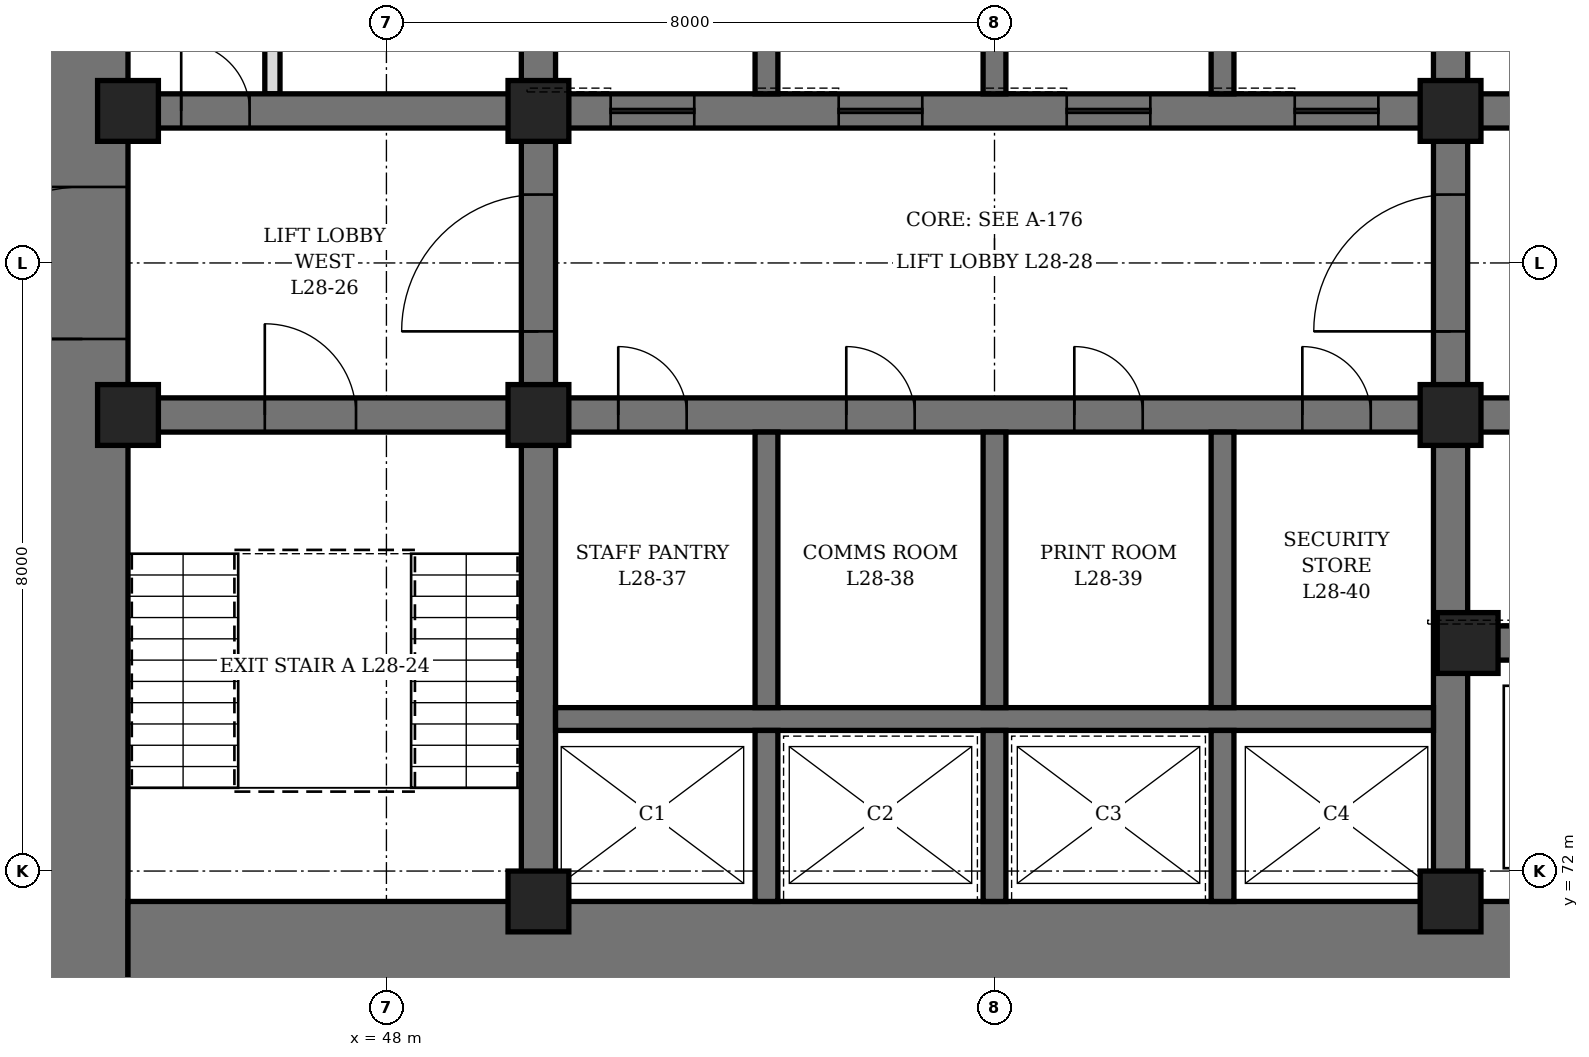
"""IFC4 building model, lengths in metres.
Left out: names, types, materials, properties, quantities, classifications, styles, units other than length and angle.
Written with IfcOpenShell. Run it as: python <this file> out.ifc"""

import sys

from ifc_helpers import new_model, si_unit, direction, frame, frame_2d, origin, origin_2d, place, context, subcontext, project, spatial, rectangle, hollow_rectangle, extrude, element, fill, save


model = new_model("IFC4")
c1 = context("Model", 3, precision=1e-05, world=origin(), true_north=direction((0.0, 1.0)))
c2 = subcontext(c1, "Body", "Model", "MODEL_VIEW")
j1 = project(units=[si_unit("LENGTHUNIT", "METRE"), si_unit("PLANEANGLEUNIT", "RADIAN")], contexts=[c1])
p1 = place(None, origin())
s1 = spatial("IfcSite", under=j1, at=p1, CompositionType="ELEMENT")
p2 = place(p1, origin())
s2 = spatial("IfcBuilding", under=s1, at=p2, CompositionType="ELEMENT")
p3 = place(p2, frame((0.0, 0.0, 129.1)))
s3 = spatial("IfcBuildingStorey", under=s2, at=p3, CompositionType="ELEMENT", Elevation=129.1)
p4 = place(p3, frame((44.0, 70.4, 0.0), z_axis=(0.0, 0.0, 1.0), x_axis=(0.0, 1.0, 0.0)))
e1 = element("IfcWall", 1, at=p4, inside=s3, PredefinedType="SHEAR", context=c2, shape_type="SweptSolid", body=[
    extrude(rectangle(XDim=19.2, YDim=1.2, at=frame_2d((9.6, 0.0))), origin(), (0.0, 0.0, 1.0), 4.2),
])
p5 = place(p4, frame((8.6, 0.0, 0.0)))
e2 = element("IfcOpeningElement", 2, at=p5, cuts=e1, PredefinedType="OPENING", context=c2, shape_type="SweptSolid", body=[
    extrude(rectangle(XDim=2.0, YDim=2.4, at=frame_2d((1.0, 1.2))), frame((0.0, 0.61, 0.0), z_axis=(0.0, -1.0, 0.0), x_axis=(1.0, 0.0, 0.0)), (0.0, 0.0, 1.0), 1.22),
])
p6 = place(p3, frame((44.6, 71.0, 0.0), z_axis=(0.0, 0.0, 1.0), x_axis=(1.0, 0.0, 0.0)))
e3 = element("IfcWall", 3, at=p6, inside=s3, PredefinedType="SHEAR", context=c2, shape_type="SweptSolid", body=[
    extrude(rectangle(XDim=22.8, YDim=1.2, at=frame_2d((11.4, 0.0))), origin(), (0.0, 0.0, 1.0), 4.2),
])
p7 = place(p3, frame((50.0, 71.6, 0.0), z_axis=(0.0, 0.0, 1.0), x_axis=(0.0, 1.0, 0.0)))
e4 = element("IfcWall", 4, at=p7, inside=s3, PredefinedType="SHEAR", context=c2, shape_type="SweptSolid", body=[
    extrude(rectangle(XDim=16.8, YDim=0.45, at=frame_2d((8.4, 0.0))), origin(), (0.0, 0.0, 1.0), 4.2),
])
p8 = place(p7, frame((7.5, 0.0, 0.0)))
e5 = element("IfcOpeningElement", 5, at=p8, cuts=e4, PredefinedType="OPENING", context=c2, shape_type="SweptSolid", body=[
    extrude(rectangle(XDim=1.8, YDim=2.4, at=frame_2d((0.9, 1.2))), frame((0.0, 0.235, 0.0), z_axis=(0.0, -1.0, 0.0), x_axis=(1.0, 0.0, 0.0)), (0.0, 0.0, 1.0), 0.47),
])
p9 = place(p3, frame((62.0, 71.6, 0.0), z_axis=(0.0, 0.0, 1.0), x_axis=(0.0, 1.0, 0.0)))
e6 = element("IfcWall", 6, at=p9, inside=s3, PredefinedType="SHEAR", context=c2, shape_type="SweptSolid", body=[
    extrude(rectangle(XDim=16.8, YDim=0.45, at=frame_2d((8.4, 0.0))), origin(), (0.0, 0.0, 1.0), 4.2),
])
p10 = place(p9, frame((7.5, 0.0, 0.0)))
e7 = element("IfcOpeningElement", 7, at=p10, cuts=e6, PredefinedType="OPENING", context=c2, shape_type="SweptSolid", body=[
    extrude(rectangle(XDim=1.8, YDim=2.4, at=frame_2d((0.9, 1.2))), frame((0.0, 0.235, 0.0), z_axis=(0.0, -1.0, 0.0), x_axis=(1.0, 0.0, 0.0)), (0.0, 0.0, 1.0), 0.47),
])
p11 = place(p3, frame((44.6, 78.0, 0.0), z_axis=(0.0, 0.0, 1.0), x_axis=(1.0, 0.0, 0.0)))
e8 = element("IfcWall", 8, at=p11, inside=s3, PredefinedType="SHEAR", context=c2, shape_type="SweptSolid", body=[
    extrude(rectangle(XDim=5.175, YDim=0.45, at=frame_2d((2.587, 0.0))), origin(), (0.0, 0.0, 1.0), 4.2),
])
p12 = place(p11, frame((1.8, 0.0, 0.0)))
e9 = element("IfcOpeningElement", 9, at=p12, cuts=e8, PredefinedType="OPENING", context=c2, shape_type="SweptSolid", body=[
    extrude(rectangle(XDim=1.2, YDim=2.1, at=frame_2d((0.6, 1.05))), frame((0.0, 0.235, 0.0), z_axis=(0.0, -1.0, 0.0), x_axis=(1.0, 0.0, 0.0)), (0.0, 0.0, 1.0), 0.47),
])
p13 = place(p3, frame((44.6, 82.0, 0.0), z_axis=(0.0, 0.0, 1.0), x_axis=(1.0, 0.0, 0.0)))
e10 = element("IfcWall", 10, at=p13, inside=s3, PredefinedType="SHEAR", context=c2, shape_type="SweptSolid", body=[
    extrude(rectangle(XDim=5.175, YDim=0.45, at=frame_2d((2.587, 0.0))), origin(), (0.0, 0.0, 1.0), 4.2),
])
p14 = place(p13, frame((0.7, 0.0, 0.0)))
e11 = element("IfcOpeningElement", 11, at=p14, cuts=e10, PredefinedType="OPENING", context=c2, shape_type="SweptSolid", body=[
    extrude(rectangle(XDim=0.9, YDim=2.1, at=frame_2d((0.45, 1.05))), frame((0.0, 0.235, 0.0), z_axis=(0.0, -1.0, 0.0), x_axis=(1.0, 0.0, 0.0)), (0.0, 0.0, 1.0), 0.47),
])
p15 = place(p3, frame((62.225, 75.0, 0.0), z_axis=(0.0, 0.0, 1.0), x_axis=(1.0, 0.0, 0.0)))
e12 = element("IfcWall", 12, at=p15, inside=s3, PredefinedType="SHEAR", context=c2, shape_type="SweptSolid", body=[
    extrude(rectangle(XDim=5.175, YDim=0.45, at=frame_2d((2.587, 0.0))), origin(), (0.0, 0.0, 1.0), 4.2),
])
p16 = place(p15, frame((0.675, 0.0, 0.0)))
e13 = element("IfcOpeningElement", 13, at=p16, cuts=e12, PredefinedType="OPENING", context=c2, shape_type="SweptSolid", body=[
    extrude(rectangle(XDim=1.2, YDim=2.2, at=frame_2d((0.6, 1.1))), frame((0.0, 0.235, 0.0), z_axis=(0.0, -1.0, 0.0), x_axis=(1.0, 0.0, 0.0)), (0.0, 0.0, 1.0), 0.47),
])
p17 = place(p15, frame((3.425, 0.0, 0.0)))
e14 = element("IfcOpeningElement", 14, at=p17, cuts=e12, PredefinedType="OPENING", context=c2, shape_type="SweptSolid", body=[
    extrude(rectangle(XDim=1.2, YDim=2.2, at=frame_2d((0.6, 1.1))), frame((0.0, 0.235, 0.0), z_axis=(0.0, -1.0, 0.0), x_axis=(1.0, 0.0, 0.0)), (0.0, 0.0, 1.0), 0.47),
])
p18 = place(p3, frame((62.225, 78.0, 0.0), z_axis=(0.0, 0.0, 1.0), x_axis=(1.0, 0.0, 0.0)))
e15 = element("IfcWall", 15, at=p18, inside=s3, PredefinedType="SHEAR", context=c2, shape_type="SweptSolid", body=[
    extrude(rectangle(XDim=5.175, YDim=0.45, at=frame_2d((2.587, 0.0))), origin(), (0.0, 0.0, 1.0), 4.2),
])
p19 = place(p18, frame((2.175, 0.0, 0.0)))
e16 = element("IfcOpeningElement", 16, at=p19, cuts=e15, PredefinedType="OPENING", context=c2, shape_type="SweptSolid", body=[
    extrude(rectangle(XDim=1.2, YDim=2.1, at=frame_2d((0.6, 1.05))), frame((0.0, 0.235, 0.0), z_axis=(0.0, -1.0, 0.0), x_axis=(1.0, 0.0, 0.0)), (0.0, 0.0, 1.0), 0.47),
])
p20 = place(p3, frame((62.225, 82.0, 0.0), z_axis=(0.0, 0.0, 1.0), x_axis=(1.0, 0.0, 0.0)))
e17 = element("IfcWall", 17, at=p20, inside=s3, PredefinedType="SHEAR", context=c2, shape_type="SweptSolid", body=[
    extrude(rectangle(XDim=5.175, YDim=0.45, at=frame_2d((2.587, 0.0))), origin(), (0.0, 0.0, 1.0), 4.2),
])
p21 = place(p20, frame((2.175, 0.0, 0.0)))
e18 = element("IfcOpeningElement", 18, at=p21, cuts=e17, PredefinedType="OPENING", context=c2, shape_type="SweptSolid", body=[
    extrude(rectangle(XDim=1.2, YDim=2.1, at=frame_2d((0.6, 1.05))), frame((0.0, 0.235, 0.0), z_axis=(0.0, -1.0, 0.0), x_axis=(1.0, 0.0, 0.0)), (0.0, 0.0, 1.0), 0.47),
])
p22 = place(p3, frame((50.225, 78.0, 0.0), z_axis=(0.0, 0.0, 1.0), x_axis=(1.0, 0.0, 0.0)))
e19 = element("IfcWall", 19, at=p22, inside=s3, PredefinedType="SHEAR", context=c2, shape_type="SweptSolid", body=[
    extrude(rectangle(XDim=11.55, YDim=0.45, at=frame_2d((5.775, 0.0))), origin(), (0.0, 0.0, 1.0), 4.2),
])
p23 = place(p22, frame((0.825, 0.0, 0.0)))
e20 = element("IfcOpeningElement", 20, at=p23, cuts=e19, PredefinedType="OPENING", context=c2, shape_type="SweptSolid", body=[
    extrude(rectangle(XDim=0.9, YDim=2.1, at=frame_2d((0.45, 1.05))), frame((0.0, 0.235, 0.0), z_axis=(0.0, -1.0, 0.0), x_axis=(1.0, 0.0, 0.0)), (0.0, 0.0, 1.0), 0.47),
])
p24 = place(p22, frame((3.825, 0.0, 0.0)))
e21 = element("IfcOpeningElement", 21, at=p24, cuts=e19, PredefinedType="OPENING", context=c2, shape_type="SweptSolid", body=[
    extrude(rectangle(XDim=0.9, YDim=2.1, at=frame_2d((0.45, 1.05))), frame((0.0, 0.235, 0.0), z_axis=(0.0, -1.0, 0.0), x_axis=(1.0, 0.0, 0.0)), (0.0, 0.0, 1.0), 0.47),
])
p25 = place(p22, frame((6.825, 0.0, 0.0)))
e22 = element("IfcOpeningElement", 22, at=p25, cuts=e19, PredefinedType="OPENING", context=c2, shape_type="SweptSolid", body=[
    extrude(rectangle(XDim=0.9, YDim=2.1, at=frame_2d((0.45, 1.05))), frame((0.0, 0.235, 0.0), z_axis=(0.0, -1.0, 0.0), x_axis=(1.0, 0.0, 0.0)), (0.0, 0.0, 1.0), 0.47),
])
p26 = place(p22, frame((9.825, 0.0, 0.0)))
e23 = element("IfcOpeningElement", 23, at=p26, cuts=e19, PredefinedType="OPENING", context=c2, shape_type="SweptSolid", body=[
    extrude(rectangle(XDim=0.9, YDim=2.1, at=frame_2d((0.45, 1.05))), frame((0.0, 0.235, 0.0), z_axis=(0.0, -1.0, 0.0), x_axis=(1.0, 0.0, 0.0)), (0.0, 0.0, 1.0), 0.47),
])
p27 = place(p3, frame((50.225, 82.0, 0.0), z_axis=(0.0, 0.0, 1.0), x_axis=(1.0, 0.0, 0.0)))
e24 = element("IfcWall", 24, at=p27, inside=s3, PredefinedType="SHEAR", context=c2, shape_type="SweptSolid", body=[
    extrude(rectangle(XDim=11.55, YDim=0.45, at=frame_2d((5.775, 0.0))), origin(), (0.0, 0.0, 1.0), 4.2),
])
p28 = place(p27, frame((0.725, 0.0, 0.0)))
e25 = element("IfcOpeningElement", 25, at=p28, cuts=e24, PredefinedType="OPENING", context=c2, shape_type="SweptSolid", body=[
    extrude(rectangle(XDim=1.1, YDim=2.2, at=frame_2d((0.55, 1.1))), frame((0.0, 0.235, 0.0), z_axis=(0.0, -1.0, 0.0), x_axis=(1.0, 0.0, 0.0)), (0.0, 0.0, 1.0), 0.47),
])
p29 = place(p27, frame((3.725, 0.0, 0.0)))
e26 = element("IfcOpeningElement", 26, at=p29, cuts=e24, PredefinedType="OPENING", context=c2, shape_type="SweptSolid", body=[
    extrude(rectangle(XDim=1.1, YDim=2.2, at=frame_2d((0.55, 1.1))), frame((0.0, 0.235, 0.0), z_axis=(0.0, -1.0, 0.0), x_axis=(1.0, 0.0, 0.0)), (0.0, 0.0, 1.0), 0.47),
])
p30 = place(p27, frame((6.725, 0.0, 0.0)))
e27 = element("IfcOpeningElement", 27, at=p30, cuts=e24, PredefinedType="OPENING", context=c2, shape_type="SweptSolid", body=[
    extrude(rectangle(XDim=1.1, YDim=2.2, at=frame_2d((0.55, 1.1))), frame((0.0, 0.235, 0.0), z_axis=(0.0, -1.0, 0.0), x_axis=(1.0, 0.0, 0.0)), (0.0, 0.0, 1.0), 0.47),
])
p31 = place(p27, frame((9.725, 0.0, 0.0)))
e28 = element("IfcOpeningElement", 28, at=p31, cuts=e24, PredefinedType="OPENING", context=c2, shape_type="SweptSolid", body=[
    extrude(rectangle(XDim=1.1, YDim=2.2, at=frame_2d((0.55, 1.1))), frame((0.0, 0.235, 0.0), z_axis=(0.0, -1.0, 0.0), x_axis=(1.0, 0.0, 0.0)), (0.0, 0.0, 1.0), 0.47),
])
p32 = place(p3, frame((50.225, 74.0, 0.0), z_axis=(0.0, 0.0, 1.0), x_axis=(1.0, 0.0, 0.0)))
e29 = element("IfcWall", 29, at=p32, inside=s3, PredefinedType="SHEAR", context=c2, shape_type="SweptSolid", body=[
    extrude(rectangle(XDim=11.55, YDim=0.3, at=frame_2d((5.775, 0.0))), origin(), (0.0, 0.0, 1.0), 4.2),
])
p33 = place(p3, frame((53.0, 71.6, 0.0), z_axis=(0.0, 0.0, 1.0), x_axis=(0.0, 1.0, 0.0)))
e30 = element("IfcWall", 30, at=p33, inside=s3, PredefinedType="SHEAR", context=c2, shape_type="SweptSolid", body=[
    extrude(rectangle(XDim=2.25, YDim=0.3, at=frame_2d((1.125, 0.0))), origin(), (0.0, 0.0, 1.0), 4.2),
])
p34 = place(p3, frame((53.0, 74.15, 0.0), z_axis=(0.0, 0.0, 1.0), x_axis=(0.0, 1.0, 0.0)))
e31 = element("IfcWall", 31, at=p34, inside=s3, PredefinedType="SHEAR", context=c2, shape_type="SweptSolid", body=[
    extrude(rectangle(XDim=3.625, YDim=0.3, at=frame_2d((1.812, 0.0))), origin(), (0.0, 0.0, 1.0), 4.2),
])
p35 = place(p3, frame((53.0, 82.225, 0.0), z_axis=(0.0, 0.0, 1.0), x_axis=(0.0, 1.0, 0.0)))
e32 = element("IfcWall", 32, at=p35, inside=s3, PredefinedType="SHEAR", context=c2, shape_type="SweptSolid", body=[
    extrude(rectangle(XDim=3.55, YDim=0.3, at=frame_2d((1.775, 0.0))), origin(), (0.0, 0.0, 1.0), 4.2),
])
p36 = place(p3, frame((56.0, 71.6, 0.0), z_axis=(0.0, 0.0, 1.0), x_axis=(0.0, 1.0, 0.0)))
e33 = element("IfcWall", 33, at=p36, inside=s3, PredefinedType="SHEAR", context=c2, shape_type="SweptSolid", body=[
    extrude(rectangle(XDim=2.25, YDim=0.3, at=frame_2d((1.125, 0.0))), origin(), (0.0, 0.0, 1.0), 4.2),
])
p37 = place(p3, frame((56.0, 74.15, 0.0), z_axis=(0.0, 0.0, 1.0), x_axis=(0.0, 1.0, 0.0)))
e34 = element("IfcWall", 34, at=p37, inside=s3, PredefinedType="SHEAR", context=c2, shape_type="SweptSolid", body=[
    extrude(rectangle(XDim=3.625, YDim=0.3, at=frame_2d((1.812, 0.0))), origin(), (0.0, 0.0, 1.0), 4.2),
])
p38 = place(p3, frame((56.0, 82.225, 0.0), z_axis=(0.0, 0.0, 1.0), x_axis=(0.0, 1.0, 0.0)))
e35 = element("IfcWall", 35, at=p38, inside=s3, PredefinedType="SHEAR", context=c2, shape_type="SweptSolid", body=[
    extrude(rectangle(XDim=3.55, YDim=0.3, at=frame_2d((1.775, 0.0))), origin(), (0.0, 0.0, 1.0), 4.2),
])
p39 = place(p3, frame((59.0, 71.6, 0.0), z_axis=(0.0, 0.0, 1.0), x_axis=(0.0, 1.0, 0.0)))
e36 = element("IfcWall", 36, at=p39, inside=s3, PredefinedType="SHEAR", context=c2, shape_type="SweptSolid", body=[
    extrude(rectangle(XDim=2.25, YDim=0.3, at=frame_2d((1.125, 0.0))), origin(), (0.0, 0.0, 1.0), 4.2),
])
p40 = place(p3, frame((59.0, 74.15, 0.0), z_axis=(0.0, 0.0, 1.0), x_axis=(0.0, 1.0, 0.0)))
e37 = element("IfcWall", 37, at=p40, inside=s3, PredefinedType="SHEAR", context=c2, shape_type="SweptSolid", body=[
    extrude(rectangle(XDim=3.625, YDim=0.3, at=frame_2d((1.812, 0.0))), origin(), (0.0, 0.0, 1.0), 4.2),
])
p41 = place(p3, frame((59.0, 82.225, 0.0), z_axis=(0.0, 0.0, 1.0), x_axis=(0.0, 1.0, 0.0)))
e38 = element("IfcWall", 38, at=p41, inside=s3, PredefinedType="SHEAR", context=c2, shape_type="SweptSolid", body=[
    extrude(rectangle(XDim=3.55, YDim=0.3, at=frame_2d((1.775, 0.0))), origin(), (0.0, 0.0, 1.0), 4.2),
])
for number, where, z_axis, x_axis in (
    (39, (44.6, 78.0, 0.0), (0.0, 0.0, 1.0), (1.0, 0.0, 0.0)),
    (40, (44.6, 82.0, 0.0), (0.0, 0.0, 1.0), (1.0, 0.0, 0.0)),
    (41, (50.0, 71.6, 0.0), (0.0, 0.0, 1.0), (1.0, 0.0, 0.0)),
    (42, (50.0, 78.0, 0.0), (0.0, 0.0, 1.0), (1.0, 0.0, 0.0)),
    (43, (50.0, 82.0, 0.0), (0.0, 0.0, 1.0), (1.0, 0.0, 0.0)),
    (44, (62.0, 71.6, 0.0), (0.0, 0.0, 1.0), (1.0, 0.0, 0.0)),
    (45, (62.0, 78.0, 0.0), (0.0, 0.0, 1.0), (1.0, 0.0, 0.0)),
    (46, (62.0, 82.0, 0.0), (0.0, 0.0, 1.0), (1.0, 0.0, 0.0)),
    (47, (62.225, 75.0, 0.0), (0.0, 0.0, 1.0), (1.0, 0.0, 0.0)),
):
    element("IfcColumn", number, at=place(p3, frame(where, z_axis=z_axis, x_axis=x_axis)), inside=s3, PredefinedType="COLUMN", context=c2, shape_type="SweptSolid", body=[
        extrude(hollow_rectangle(XDim=0.8, YDim=0.8, WallThickness=0.1, at=origin_2d()), origin(), (0.0, 0.0, 1.0), 4.2),
    ])
p42 = place(p3, frame((46.5, 82.225, 0.0), z_axis=(0.0, 0.0, 1.0), x_axis=(0.0, 1.0, 0.0)))
e48 = element("IfcWall", 48, at=p42, inside=s3, PredefinedType="PARTITIONING", context=c2, shape_type="SweptSolid", body=[
    extrude(rectangle(XDim=3.05, YDim=0.2, at=frame_2d((1.525, 0.0))), origin(), (0.0, 0.0, 1.0), 4.04),
])
p43 = place(p42, frame((1.075, 0.0, 0.0)))
e49 = element("IfcOpeningElement", 49, at=p43, cuts=e48, PredefinedType="OPENING", context=c2, shape_type="SweptSolid", body=[
    extrude(rectangle(XDim=0.9, YDim=2.1, at=frame_2d((0.45, 1.05))), frame((0.0, 0.11, 0.0), z_axis=(0.0, -1.0, 0.0), x_axis=(1.0, 0.0, 0.0)), (0.0, 0.0, 1.0), 0.22),
])
p44 = place(p14, origin())
e50 = element("IfcDoor", 50, at=p44, inside=s3, OperationType="SINGLE_SWING_LEFT", PredefinedType="DOOR", context=c2, shape_type="SweptSolid", body=[
    extrude(rectangle(XDim=0.9, YDim=2.1, at=frame_2d((0.45, 1.05))), frame((0.0, 0.225, 0.0), z_axis=(0.0, -1.0, 0.0), x_axis=(1.0, 0.0, 0.0)), (0.0, 0.0, 1.0), 0.449),
])
fill(e11, e50)
p45 = place(p23, origin())
e51 = element("IfcDoor", 51, at=p45, inside=s3, OperationType="SINGLE_SWING_LEFT", PredefinedType="DOOR", context=c2, shape_type="SweptSolid", body=[
    extrude(rectangle(XDim=0.9, YDim=2.1, at=frame_2d((0.45, 1.05))), frame((0.0, 0.225, 0.0), z_axis=(0.0, -1.0, 0.0), x_axis=(1.0, 0.0, 0.0)), (0.0, 0.0, 1.0), 0.449),
])
fill(e20, e51)
p46 = place(p24, origin())
e52 = element("IfcDoor", 52, at=p46, inside=s3, OperationType="SINGLE_SWING_LEFT", PredefinedType="DOOR", context=c2, shape_type="SweptSolid", body=[
    extrude(rectangle(XDim=0.9, YDim=2.1, at=frame_2d((0.45, 1.05))), frame((0.0, 0.225, 0.0), z_axis=(0.0, -1.0, 0.0), x_axis=(1.0, 0.0, 0.0)), (0.0, 0.0, 1.0), 0.449),
])
fill(e21, e52)
p47 = place(p25, origin())
e53 = element("IfcDoor", 53, at=p47, inside=s3, OperationType="SINGLE_SWING_LEFT", PredefinedType="DOOR", context=c2, shape_type="SweptSolid", body=[
    extrude(rectangle(XDim=0.9, YDim=2.1, at=frame_2d((0.45, 1.05))), frame((0.0, 0.225, 0.0), z_axis=(0.0, -1.0, 0.0), x_axis=(1.0, 0.0, 0.0)), (0.0, 0.0, 1.0), 0.449),
])
fill(e22, e53)
p48 = place(p26, origin())
e54 = element("IfcDoor", 54, at=p48, inside=s3, OperationType="SINGLE_SWING_LEFT", PredefinedType="DOOR", context=c2, shape_type="SweptSolid", body=[
    extrude(rectangle(XDim=0.9, YDim=2.1, at=frame_2d((0.45, 1.05))), frame((0.0, 0.225, 0.0), z_axis=(0.0, -1.0, 0.0), x_axis=(1.0, 0.0, 0.0)), (0.0, 0.0, 1.0), 0.449),
])
fill(e23, e54)
p49 = place(p12, origin())
e55 = element("IfcDoor", 55, at=p49, inside=s3, OperationType="SINGLE_SWING_LEFT", PredefinedType="DOOR", context=c2, shape_type="SweptSolid", body=[
    extrude(rectangle(XDim=1.2, YDim=2.1, at=frame_2d((0.6, 1.05))), frame((0.0, 0.225, 0.0), z_axis=(0.0, -1.0, 0.0), x_axis=(1.0, 0.0, 0.0)), (0.0, 0.0, 1.0), 0.449),
])
fill(e9, e55)
p50 = place(p5, origin())
e56 = element("IfcDoor", 56, at=p50, inside=s3, OperationType="DOUBLE_DOOR_SINGLE_SWING", PredefinedType="DOOR", context=c2, shape_type="SweptSolid", body=[
    extrude(rectangle(XDim=2.0, YDim=2.4, at=frame_2d((1.0, 1.2))), frame((0.0, 0.35, 0.0), z_axis=(0.0, -1.0, 0.0), x_axis=(1.0, 0.0, 0.0)), (0.0, 0.0, 1.0), 0.7),
])
fill(e2, e56)
p51 = place(p8, origin())
e57 = element("IfcDoor", 57, at=p51, inside=s3, OperationType="DOUBLE_DOOR_SINGLE_SWING", PredefinedType="DOOR", context=c2, shape_type="SweptSolid", body=[
    extrude(rectangle(XDim=1.8, YDim=2.4, at=frame_2d((0.9, 1.2))), frame((0.0, 0.225, 0.0), z_axis=(0.0, -1.0, 0.0), x_axis=(1.0, 0.0, 0.0)), (0.0, 0.0, 1.0), 0.449),
])
fill(e5, e57)
p52 = place(p10, origin())
e58 = element("IfcDoor", 58, at=p52, inside=s3, OperationType="DOUBLE_DOOR_SINGLE_SWING", PredefinedType="DOOR", context=c2, shape_type="SweptSolid", body=[
    extrude(rectangle(XDim=1.8, YDim=2.4, at=frame_2d((0.9, 1.2))), frame((0.0, 0.225, 0.0), z_axis=(0.0, -1.0, 0.0), x_axis=(1.0, 0.0, 0.0)), (0.0, 0.0, 1.0), 0.449),
])
fill(e7, e58)
p53 = place(p28, origin())
e59 = element("IfcDoor", 59, at=p53, inside=s3, OperationType="SLIDING_TO_LEFT", PredefinedType="DOOR", context=c2, shape_type="SweptSolid", body=[
    extrude(rectangle(XDim=1.1, YDim=2.2, at=frame_2d((0.55, 1.1))), frame((0.0, 0.225, 0.0), z_axis=(0.0, -1.0, 0.0), x_axis=(1.0, 0.0, 0.0)), (0.0, 0.0, 1.0), 0.449),
])
fill(e25, e59)
p54 = place(p29, origin())
e60 = element("IfcDoor", 60, at=p54, inside=s3, OperationType="SLIDING_TO_LEFT", PredefinedType="DOOR", context=c2, shape_type="SweptSolid", body=[
    extrude(rectangle(XDim=1.1, YDim=2.2, at=frame_2d((0.55, 1.1))), frame((0.0, 0.225, 0.0), z_axis=(0.0, -1.0, 0.0), x_axis=(1.0, 0.0, 0.0)), (0.0, 0.0, 1.0), 0.449),
])
fill(e26, e60)
p55 = place(p30, origin())
e61 = element("IfcDoor", 61, at=p55, inside=s3, OperationType="SLIDING_TO_LEFT", PredefinedType="DOOR", context=c2, shape_type="SweptSolid", body=[
    extrude(rectangle(XDim=1.1, YDim=2.2, at=frame_2d((0.55, 1.1))), frame((0.0, 0.225, 0.0), z_axis=(0.0, -1.0, 0.0), x_axis=(1.0, 0.0, 0.0)), (0.0, 0.0, 1.0), 0.449),
])
fill(e27, e61)
p56 = place(p31, origin())
e62 = element("IfcDoor", 62, at=p56, inside=s3, OperationType="SLIDING_TO_LEFT", PredefinedType="DOOR", context=c2, shape_type="SweptSolid", body=[
    extrude(rectangle(XDim=1.1, YDim=2.2, at=frame_2d((0.55, 1.1))), frame((0.0, 0.225, 0.0), z_axis=(0.0, -1.0, 0.0), x_axis=(1.0, 0.0, 0.0)), (0.0, 0.0, 1.0), 0.449),
])
fill(e28, e62)
save(model, sys.argv[1])
